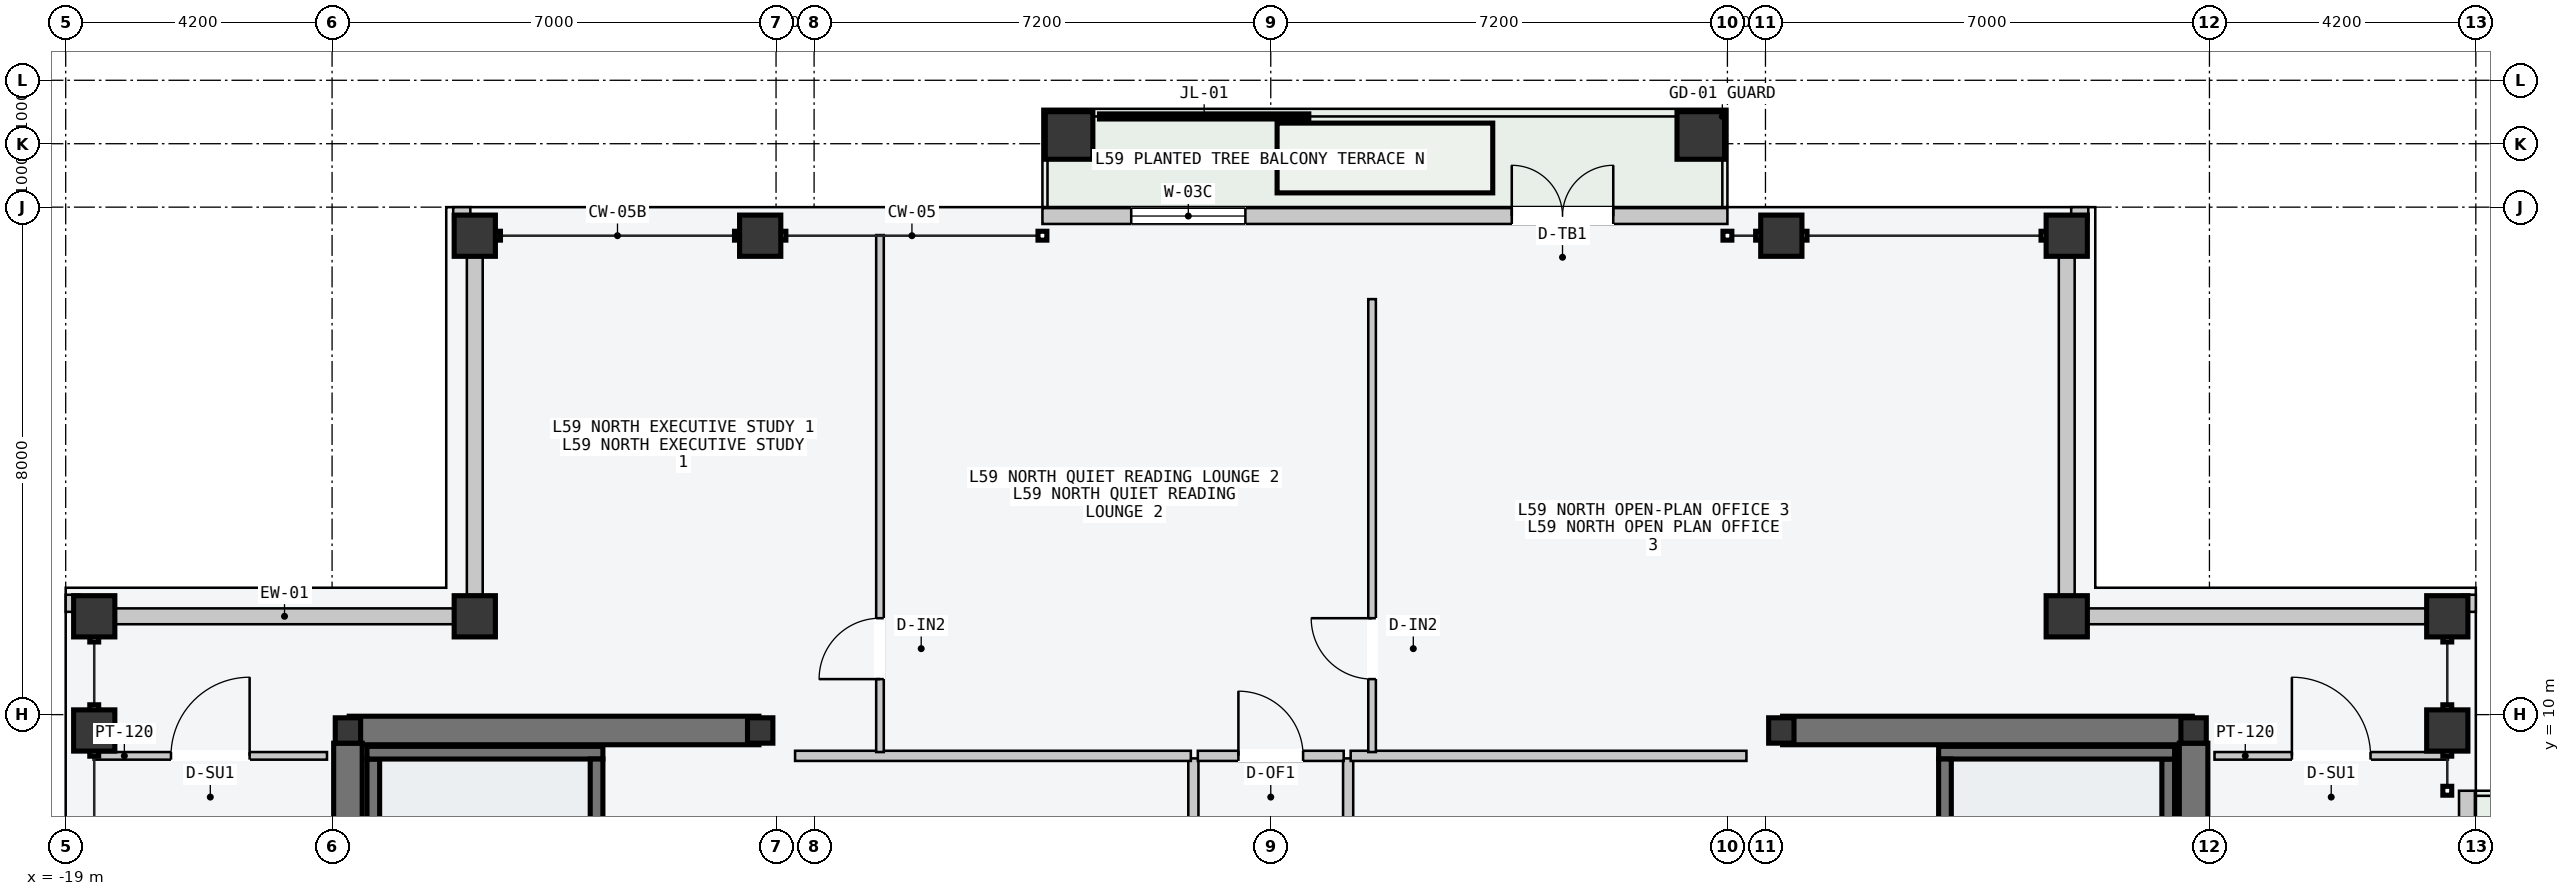
"""IFC4 building model, lengths in metres.
Left out: names, types, materials, properties, quantities, classifications, styles, units other than length and angle.
Written with IfcOpenShell. Run it as: python <this file> out.ifc"""

import sys

from ifc_helpers import new_model, si_unit, direction, frame, frame_2d, origin, origin_2d, place, context, subcontext, project, spatial, rectangle, hollow_rectangle, i_section, extrude, element, fill, save


model = new_model("IFC4")
c1 = context("Model", 3, precision=1e-05, world=origin(), true_north=direction((0.0, 1.0)))
c2 = subcontext(c1, "Body", "Model", "MODEL_VIEW")
j1 = project(units=[si_unit("LENGTHUNIT", "METRE"), si_unit("PLANEANGLEUNIT", "RADIAN")], contexts=[c1])
p1 = place(None, origin())
s1 = spatial("IfcSite", under=j1, at=p1, CompositionType="ELEMENT")
p2 = place(p1, origin())
s2 = spatial("IfcBuilding", under=s1, at=p2, CompositionType="ELEMENT")
p3 = place(p2, frame((0.0, 0.0, 225.6)))
s3 = spatial("IfcBuildingStorey", under=s2, at=p3, CompositionType="ELEMENT", Elevation=225.6)
p4 = place(p3, frame((-14.53, 9.75, -0.2), z_axis=(0.0, 0.0, 1.0), x_axis=(1.0, 0.0, 0.0)))
e1 = element("IfcWall", 1, at=p4, inside=s3, PredefinedType="SHEAR", context=c2, shape_type="SweptSolid", body=[
    extrude(rectangle(XDim=6.46, YDim=0.45, at=frame_2d((3.23, 0.0))), origin(), (0.0, 0.0, 1.0), 3.6),
])
p5 = place(p3, frame((-14.55, 0.2, -0.2), z_axis=(0.0, 0.0, 1.0), x_axis=(0.0, 1.0, 0.0)))
e2 = element("IfcWall", 2, at=p5, inside=s3, PredefinedType="SHEAR", context=c2, shape_type="SweptSolid", body=[
    extrude(rectangle(XDim=9.35, YDim=0.45, at=frame_2d((4.675, 0.0))), origin(), (0.0, 0.0, 1.0), 3.6),
])
p6 = place(p3, frame((8.07, 9.75, -0.2), z_axis=(0.0, 0.0, 1.0), x_axis=(1.0, 0.0, 0.0)))
e3 = element("IfcWall", 3, at=p6, inside=s3, PredefinedType="SHEAR", context=c2, shape_type="SweptSolid", body=[
    extrude(rectangle(XDim=6.46, YDim=0.45, at=frame_2d((3.23, 0.0))), origin(), (0.0, 0.0, 1.0), 3.6),
])
p7 = place(p3, frame((14.55, 0.2, -0.2), z_axis=(0.0, 0.0, 1.0), x_axis=(0.0, 1.0, 0.0)))
e4 = element("IfcWall", 4, at=p7, inside=s3, PredefinedType="SHEAR", context=c2, shape_type="SweptSolid", body=[
    extrude(rectangle(XDim=9.35, YDim=0.45, at=frame_2d((4.675, 0.0))), origin(), (0.0, 0.0, 1.0), 3.6),
])
for number, where, z_axis, x_axis in (
    (5, (-14.15, 1.5, -0.2), (0.0, 0.0, 1.0), (0.0, 1.0, 0.0)),
    (6, (14.15, 1.5, -0.2), (0.0, 0.0, 1.0), (0.0, 1.0, 0.0)),
):
    element("IfcWall", number, at=place(p3, frame(where, z_axis=z_axis, x_axis=x_axis)), inside=s3, PredefinedType="SOLIDWALL", context=c2, shape_type="SweptSolid", body=[
        extrude(rectangle(XDim=7.8, YDim=0.2, at=frame_2d((3.9, 0.0))), origin(), (0.0, 0.0, 1.0), 3.6),
    ])
p8 = place(p3, frame((-14.25, 9.4, -0.2), z_axis=(0.0, 0.0, 1.0), x_axis=(1.0, 0.0, 0.0)))
e7 = element("IfcWall", 7, at=p8, inside=s3, PredefinedType="SOLIDWALL", context=c2, shape_type="SweptSolid", body=[
    extrude(rectangle(XDim=3.72, YDim=0.2, at=frame_2d((1.86, 0.0))), origin(), (0.0, 0.0, 1.0), 3.6),
])
p9 = place(p3, frame((-10.63, 1.5, -0.2), z_axis=(0.0, 0.0, 1.0), x_axis=(0.0, 1.0, 0.0)))
e8 = element("IfcWall", 8, at=p9, inside=s3, PredefinedType="SOLIDWALL", context=c2, shape_type="SweptSolid", body=[
    extrude(rectangle(XDim=7.8, YDim=0.2, at=frame_2d((3.9, 0.0))), origin(), (0.0, 0.0, 1.0), 3.6),
])
p10 = place(p3, frame((10.53, 9.4, -0.2), z_axis=(0.0, 0.0, 1.0), x_axis=(1.0, 0.0, 0.0)))
e9 = element("IfcWall", 9, at=p10, inside=s3, PredefinedType="SOLIDWALL", context=c2, shape_type="SweptSolid", body=[
    extrude(rectangle(XDim=3.72, YDim=0.2, at=frame_2d((1.86, 0.0))), origin(), (0.0, 0.0, 1.0), 3.6),
])
p11 = place(p3, frame((10.63, 1.5, -0.2), z_axis=(0.0, 0.0, 1.0), x_axis=(0.0, 1.0, 0.0)))
e10 = element("IfcWall", 10, at=p11, inside=s3, PredefinedType="SOLIDWALL", context=c2, shape_type="SweptSolid", body=[
    extrude(rectangle(XDim=7.8, YDim=0.2, at=frame_2d((3.9, 0.0))), origin(), (0.0, 0.0, 1.0), 3.6),
])
for number, where, z_axis, x_axis in (
    (11, (-14.55, 9.75, 0.0), (0.0, 0.0, 1.0), (1.0, 0.0, 0.0)),
    (12, (-8.05, 9.75, 0.0), (0.0, 0.0, 1.0), (1.0, 0.0, 0.0)),
    (13, (8.05, 9.75, 0.0), (0.0, 0.0, 1.0), (1.0, 0.0, 0.0)),
    (14, (14.55, 9.75, 0.0), (0.0, 0.0, 1.0), (1.0, 0.0, 0.0)),
):
    element("IfcColumn", number, at=place(p3, frame(where, z_axis=z_axis, x_axis=x_axis)), inside=s3, PredefinedType="COLUMN", context=c2, shape_type="SweptSolid", body=[
        extrude(i_section(OverallWidth=0.4, OverallDepth=0.4, WebThickness=0.013, FlangeThickness=0.021, at=origin_2d()), origin(), (0.0, 0.0, 1.0), 3.6),
    ])
for number, where, z_axis, x_axis in (
    (15, (-12.55, 17.55, 0.0), (0.0, 0.0, 1.0), (1.0, 0.0, 0.0)),
    (16, (-8.05, 17.55, 0.0), (0.0, 0.0, 1.0), (1.0, 0.0, 0.0)),
    (17, (8.05, 17.55, 0.0), (0.0, 0.0, 1.0), (1.0, 0.0, 0.0)),
    (18, (12.55, 17.55, 0.0), (0.0, 0.0, 1.0), (1.0, 0.0, 0.0)),
    (19, (-18.55, 9.75, 0.0), (0.0, 0.0, 1.0), (0.0, 1.0, 0.0)),
    (20, (-18.55, 11.55, 0.0), (0.0, 0.0, 1.0), (0.0, 1.0, 0.0)),
    (21, (18.55, 9.75, 0.0), (0.0, 0.0, 1.0), (0.0, 1.0, 0.0)),
    (22, (18.55, 11.55, 0.0), (0.0, 0.0, 1.0), (0.0, 1.0, 0.0)),
    (23, (-12.55, 11.55, 0.0), (0.0, 0.0, 1.0), (1.0, 0.0, 0.0)),
    (24, (12.55, 11.55, 0.0), (0.0, 0.0, 1.0), (1.0, 0.0, 0.0)),
):
    element("IfcColumn", number, at=place(p3, frame(where, z_axis=z_axis, x_axis=x_axis)), inside=s3, PredefinedType="COLUMN", context=c2, shape_type="SweptSolid", body=[
        extrude(hollow_rectangle(XDim=0.65, YDim=0.65, WallThickness=0.028, at=origin_2d()), origin(), (0.0, 0.0, 1.0), 3.6),
    ])
for number, where, z_axis, x_axis in (
    (25, (-3.18, 19.13, 0.0), (0.0, 0.0, 1.0), (1.0, 0.0, 0.0)),
    (26, (6.78, 19.13, 0.0), (0.0, 0.0, 1.0), (1.0, 0.0, 0.0)),
):
    element("IfcColumn", number, at=place(p3, frame(where, z_axis=z_axis, x_axis=x_axis)), inside=s3, PredefinedType="COLUMN", context=c2, shape_type="SweptSolid", body=[
        extrude(hollow_rectangle(XDim=0.75, YDim=0.75, WallThickness=0.032, at=origin_2d()), origin(), (0.0, 0.0, 1.0), 3.6),
    ])
p12 = place(p3, frame((-3.6, 17.86, 0.0), z_axis=(0.0, 0.0, 1.0), x_axis=(1.0, 0.0, 0.0)))
e27 = element("IfcWall", 27, at=p12, inside=s3, PredefinedType="STANDARD", context=c2, shape_type="SweptSolid", body=[
    extrude(rectangle(XDim=10.8, YDim=0.25, at=frame_2d((5.4, 0.0))), origin(), (0.0, 0.0, 1.0), 3.4),
])
p13 = place(p12, frame((7.4, 0.0, 0.0)))
e28 = element("IfcOpeningElement", 28, at=p13, cuts=e27, PredefinedType="OPENING", context=c2, shape_type="SweptSolid", body=[
    extrude(rectangle(XDim=1.6, YDim=2.2, at=frame_2d((0.8, 1.1))), frame((0.0, 0.135, 0.0), z_axis=(0.0, -1.0, 0.0), x_axis=(1.0, 0.0, 0.0)), (0.0, 0.0, 1.0), 0.27),
])
p14 = place(p12, frame((1.4, 0.0, 0.85)))
e29 = element("IfcOpeningElement", 29, at=p14, cuts=e27, PredefinedType="OPENING", context=c2, shape_type="SweptSolid", body=[
    extrude(rectangle(XDim=1.8, YDim=2.05, at=frame_2d((0.9, 1.025))), frame((0.0, 0.135, 0.0), z_axis=(0.0, -1.0, 0.0), x_axis=(1.0, 0.0, 0.0)), (0.0, 0.0, 1.0), 0.27),
])
p15 = place(p3, frame((18.86, -2.0, 0.0), z_axis=(0.0, 0.0, 1.0), x_axis=(0.0, 1.0, 0.0)))
e30 = element("IfcWall", 30, at=p15, inside=s3, PredefinedType="STANDARD", context=c2, shape_type="SweptSolid", body=[
    extrude(rectangle(XDim=10.8, YDim=0.25, at=frame_2d((5.4, 0.0))), origin(), (0.0, 0.0, 1.0), 3.4),
])
p16 = place(p15, frame((6.6, 0.0, 0.0)))
e31 = element("IfcOpeningElement", 31, at=p16, cuts=e30, PredefinedType="OPENING", context=c2, shape_type="SweptSolid", body=[
    extrude(rectangle(XDim=1.6, YDim=2.2, at=frame_2d((0.8, 1.1))), frame((0.0, 0.135, 0.0), z_axis=(0.0, -1.0, 0.0), x_axis=(1.0, 0.0, 0.0)), (0.0, 0.0, 1.0), 0.27),
])
p17 = place(p15, frame((1.4, 0.0, 0.85)))
e32 = element("IfcOpeningElement", 32, at=p17, cuts=e30, PredefinedType="OPENING", context=c2, shape_type="SweptSolid", body=[
    extrude(rectangle(XDim=1.8, YDim=2.05, at=frame_2d((0.9, 1.025))), frame((0.0, 0.135, 0.0), z_axis=(0.0, -1.0, 0.0), x_axis=(1.0, 0.0, 0.0)), (0.0, 0.0, 1.0), 0.27),
])
for number, where, z_axis, x_axis in (
    (33, (-18.215, 11.55, 0.0), (0.0, 0.0, 1.0), (1.0, 0.0, 0.0)),
    (34, (-12.55, 11.885, 0.0), (0.0, 0.0, 1.0), (0.0, 1.0, 0.0)),
    (35, (12.885, 11.55, 0.0), (0.0, 0.0, 1.0), (1.0, 0.0, 0.0)),
    (36, (12.55, 11.885, 0.0), (0.0, 0.0, 1.0), (0.0, 1.0, 0.0)),
):
    element("IfcWall", number, at=place(p3, frame(where, z_axis=z_axis, x_axis=x_axis)), inside=s3, PredefinedType="STANDARD", context=c2, shape_type="SweptSolid", body=[
        extrude(rectangle(XDim=5.33, YDim=0.25, at=frame_2d((2.665, 0.0))), origin(), (0.0, 0.0, 1.0), 2.85),
    ])
for number, where, z_axis, x_axis in (
    (37, (-12.89, 17.89, 0.0), (0.0, 0.0, 1.0), (1.0, 0.0, 0.0)),
    (38, (-18.89, 11.62, 0.0), (0.0, 0.0, 1.0), (0.0, 1.0, 0.0)),
    (39, (12.62, 17.89, 0.0), (0.0, 0.0, 1.0), (1.0, 0.0, 0.0)),
    (40, (18.89, 11.62, 0.0), (0.0, 0.0, 1.0), (0.0, 1.0, 0.0)),
):
    element("IfcWall", number, at=place(p3, frame(where, z_axis=z_axis, x_axis=x_axis)), inside=s3, PredefinedType="PARAPET", context=c2, shape_type="SweptSolid", body=[
        extrude(rectangle(XDim=0.27, YDim=0.22, at=frame_2d((0.135, 0.0))), origin(), (0.0, 0.0, 1.0), 1.2),
    ])
p18 = place(p3, frame((-1.22, -3.5, 0.0), z_axis=(0.0, 0.0, 1.0), x_axis=(0.0, 1.0, 0.0)))
e41 = element("IfcWall", 41, at=p18, inside=s3, PredefinedType="PARTITIONING", context=c2, shape_type="SweptSolid", body=[
    extrude(rectangle(XDim=12.81, YDim=0.16, at=frame_2d((6.405, 0.0))), origin(), (0.0, 0.0, 1.0), 3.4),
])
p19 = place(p18, frame((6.1, 0.0, 0.0)))
e42 = element("IfcOpeningElement", 42, at=p19, cuts=e41, PredefinedType="OPENING", context=c2, shape_type="SweptSolid", body=[
    extrude(rectangle(XDim=1.24, YDim=2.24, at=frame_2d((0.62, 1.12))), frame((0.0, 0.09, 0.0), z_axis=(0.0, -1.0, 0.0), x_axis=(1.0, 0.0, 0.0)), (0.0, 0.0, 1.0), 0.18),
])
p20 = place(p18, frame((1.6, 0.0, 0.0)))
e43 = element("IfcOpeningElement", 43, at=p20, cuts=e41, PredefinedType="OPENING", context=c2, shape_type="SweptSolid", body=[
    extrude(rectangle(XDim=0.96, YDim=2.18, at=frame_2d((0.48, 1.09))), frame((0.0, 0.09, 0.0), z_axis=(0.0, -1.0, 0.0), x_axis=(1.0, 0.0, 0.0)), (0.0, 0.0, 1.0), 0.18),
])
p21 = place(p3, frame((-7.5, 9.35, 0.0), z_axis=(0.0, 0.0, 1.0), x_axis=(1.0, 0.0, 0.0)))
e44 = element("IfcWall", 44, at=p21, inside=s3, PredefinedType="PARTITIONING", context=c2, shape_type="SweptSolid", body=[
    extrude(rectangle(XDim=6.24, YDim=0.16, at=frame_2d((3.12, 0.0))), origin(), (0.0, 0.0, 1.0), 3.4),
])
p22 = place(p3, frame((1.22, -3.5, 0.0), z_axis=(0.0, 0.0, 1.0), x_axis=(0.0, 1.0, 0.0)))
e45 = element("IfcWall", 45, at=p22, inside=s3, PredefinedType="PARTITIONING", context=c2, shape_type="SweptSolid", body=[
    extrude(rectangle(XDim=12.81, YDim=0.16, at=frame_2d((6.405, 0.0))), origin(), (0.0, 0.0, 1.0), 3.4),
])
p23 = place(p22, frame((6.1, 0.0, 0.0)))
e46 = element("IfcOpeningElement", 46, at=p23, cuts=e45, PredefinedType="OPENING", context=c2, shape_type="SweptSolid", body=[
    extrude(rectangle(XDim=1.24, YDim=2.24, at=frame_2d((0.62, 1.12))), frame((0.0, 0.09, 0.0), z_axis=(0.0, -1.0, 0.0), x_axis=(1.0, 0.0, 0.0)), (0.0, 0.0, 1.0), 0.18),
])
p24 = place(p22, frame((1.6, 0.0, 0.0)))
e47 = element("IfcOpeningElement", 47, at=p24, cuts=e45, PredefinedType="OPENING", context=c2, shape_type="SweptSolid", body=[
    extrude(rectangle(XDim=0.96, YDim=2.18, at=frame_2d((0.48, 1.09))), frame((0.0, 0.09, 0.0), z_axis=(0.0, -1.0, 0.0), x_axis=(1.0, 0.0, 0.0)), (0.0, 0.0, 1.0), 0.18),
])
p25 = place(p3, frame((1.26, 9.35, 0.0), z_axis=(0.0, 0.0, 1.0), x_axis=(1.0, 0.0, 0.0)))
e48 = element("IfcWall", 48, at=p25, inside=s3, PredefinedType="PARTITIONING", context=c2, shape_type="SweptSolid", body=[
    extrude(rectangle(XDim=6.24, YDim=0.16, at=frame_2d((3.12, 0.0))), origin(), (0.0, 0.0, 1.0), 3.4),
])
p26 = place(p3, frame((-6.161, 9.41, 0.0), z_axis=(0.0, 0.0, 1.0), x_axis=(0.0, 1.0, 0.0)))
e49 = element("IfcWall", 49, at=p26, inside=s3, PredefinedType="PARTITIONING", context=c2, shape_type="SweptSolid", body=[
    extrude(rectangle(XDim=8.15, YDim=0.12, at=frame_2d((4.075, 0.0))), origin(), (0.0, 0.0, 1.0), 3.4),
])
p27 = place(p26, frame((1.15, 0.0, 0.0)))
e50 = element("IfcOpeningElement", 50, at=p27, cuts=e49, PredefinedType="OPENING", context=c2, shape_type="SweptSolid", body=[
    extrude(rectangle(XDim=0.96, YDim=2.18, at=frame_2d((0.48, 1.09))), frame((0.0, 0.07, 0.0), z_axis=(0.0, -1.0, 0.0), x_axis=(1.0, 0.0, 0.0)), (0.0, 0.0, 1.0), 0.14),
])
p28 = place(p3, frame((1.597, 9.41, 0.0), z_axis=(0.0, 0.0, 1.0), x_axis=(0.0, 1.0, 0.0)))
e51 = element("IfcWall", 51, at=p28, inside=s3, PredefinedType="PARTITIONING", context=c2, shape_type="SweptSolid", body=[
    extrude(rectangle(XDim=7.14, YDim=0.12, at=frame_2d((3.57, 0.0))), origin(), (0.0, 0.0, 1.0), 3.4),
])
p29 = place(p28, frame((1.15, 0.0, 0.0)))
e52 = element("IfcOpeningElement", 52, at=p29, cuts=e51, PredefinedType="OPENING", context=c2, shape_type="SweptSolid", body=[
    extrude(rectangle(XDim=0.96, YDim=2.18, at=frame_2d((0.48, 1.09))), frame((0.0, 0.07, 0.0), z_axis=(0.0, -1.0, 0.0), x_axis=(1.0, 0.0, 0.0)), (0.0, 0.0, 1.0), 0.14),
])
p30 = place(p3, frame((-1.15, 9.35, 0.0), z_axis=(0.0, 0.0, 1.0), x_axis=(1.0, 0.0, 0.0)))
e53 = element("IfcWall", 53, at=p30, inside=s3, PredefinedType="PARTITIONING", context=c2, shape_type="SweptSolid", body=[
    extrude(rectangle(XDim=2.3, YDim=0.16, at=frame_2d((1.15, 0.0))), origin(), (0.0, 0.0, 1.0), 3.4),
])
p31 = place(p30, frame((0.64, 0.0, 0.0)))
e54 = element("IfcOpeningElement", 54, at=p31, cuts=e53, PredefinedType="OPENING", context=c2, shape_type="SweptSolid", body=[
    extrude(rectangle(XDim=1.02, YDim=2.2, at=frame_2d((0.51, 1.1))), frame((0.0, 0.09, 0.0), z_axis=(0.0, -1.0, 0.0), x_axis=(1.0, 0.0, 0.0)), (0.0, 0.0, 1.0), 0.18),
])
p32 = place(p3, frame((-18.56, 9.35, 0.0), z_axis=(0.0, 0.0, 1.0), x_axis=(1.0, 0.0, 0.0)))
e55 = element("IfcWall", 55, at=p32, inside=s3, PredefinedType="PARTITIONING", context=c2, shape_type="SweptSolid", body=[
    extrude(rectangle(XDim=3.68, YDim=0.12, at=frame_2d((1.84, 0.0))), origin(), (0.0, 0.0, 1.0), 3.4),
])
p33 = place(p32, frame((1.22, 0.0, 0.0)))
e56 = element("IfcOpeningElement", 56, at=p33, cuts=e55, PredefinedType="OPENING", context=c2, shape_type="SweptSolid", body=[
    extrude(rectangle(XDim=1.24, YDim=2.24, at=frame_2d((0.62, 1.12))), frame((0.0, 0.07, 0.0), z_axis=(0.0, -1.0, 0.0), x_axis=(1.0, 0.0, 0.0)), (0.0, 0.0, 1.0), 0.14),
])
p34 = place(p3, frame((14.88, 9.35, 0.0), z_axis=(0.0, 0.0, 1.0), x_axis=(1.0, 0.0, 0.0)))
e57 = element("IfcWall", 57, at=p34, inside=s3, PredefinedType="PARTITIONING", context=c2, shape_type="SweptSolid", body=[
    extrude(rectangle(XDim=3.68, YDim=0.12, at=frame_2d((1.84, 0.0))), origin(), (0.0, 0.0, 1.0), 3.4),
])
p35 = place(p34, frame((1.22, 0.0, 0.0)))
e58 = element("IfcOpeningElement", 58, at=p35, cuts=e57, PredefinedType="OPENING", context=c2, shape_type="SweptSolid", body=[
    extrude(rectangle(XDim=1.24, YDim=2.24, at=frame_2d((0.62, 1.12))), frame((0.0, 0.07, 0.0), z_axis=(0.0, -1.0, 0.0), x_axis=(1.0, 0.0, 0.0)), (0.0, 0.0, 1.0), 0.14),
])
p36 = place(p13, origin())
e59 = element("IfcDoor", 59, at=p36, inside=s3, OperationType="DOUBLE_DOOR_SINGLE_SWING", PredefinedType="DOOR", context=c2, shape_type="SweptSolid", body=[
    extrude(rectangle(XDim=1.6, YDim=2.2, at=frame_2d((0.8, 1.1))), frame((0.0, 0.025, 0.0), z_axis=(0.0, -1.0, 0.0), x_axis=(1.0, 0.0, 0.0)), (0.0, 0.0, 1.0), 0.05),
])
fill(e28, e59)
p37 = place(p14, origin())
e60 = element("IfcWindow", 60, at=p37, inside=s3, PartitioningType="SINGLE_PANEL", PredefinedType="WINDOW", context=c2, shape_type="SweptSolid", body=[
    extrude(rectangle(XDim=1.8, YDim=2.05, at=frame_2d((0.9, 1.025))), frame((0.0, 0.03, 0.0), z_axis=(0.0, -1.0, 0.0), x_axis=(1.0, 0.0, 0.0)), (0.0, 0.0, 1.0), 0.06),
])
fill(e29, e60)
p38 = place(p27, origin())
e61 = element("IfcDoor", 61, at=p38, inside=s3, OperationType="SINGLE_SWING_LEFT", PredefinedType="DOOR", context=c2, shape_type="SweptSolid", body=[
    extrude(rectangle(XDim=0.96, YDim=2.18, at=frame_2d((0.48, 1.09))), frame((0.0, 0.025, 0.0), z_axis=(0.0, -1.0, 0.0), x_axis=(1.0, 0.0, 0.0)), (0.0, 0.0, 1.0), 0.05),
])
fill(e50, e61)
p39 = place(p29, origin())
e62 = element("IfcDoor", 62, at=p39, inside=s3, OperationType="SINGLE_SWING_RIGHT", PredefinedType="DOOR", context=c2, shape_type="SweptSolid", body=[
    extrude(rectangle(XDim=0.96, YDim=2.18, at=frame_2d((0.48, 1.09))), frame((0.0, 0.025, 0.0), z_axis=(0.0, -1.0, 0.0), x_axis=(1.0, 0.0, 0.0)), (0.0, 0.0, 1.0), 0.05),
])
fill(e52, e62)
p40 = place(p31, origin())
e63 = element("IfcDoor", 63, at=p40, inside=s3, OperationType="SINGLE_SWING_LEFT", PredefinedType="DOOR", context=c2, shape_type="SweptSolid", body=[
    extrude(rectangle(XDim=1.02, YDim=2.2, at=frame_2d((0.51, 1.1))), frame((0.0, 0.025, 0.0), z_axis=(0.0, -1.0, 0.0), x_axis=(1.0, 0.0, 0.0)), (0.0, 0.0, 1.0), 0.05),
])
fill(e54, e63)
p41 = place(p33, origin())
e64 = element("IfcDoor", 64, at=p41, inside=s3, OperationType="SINGLE_SWING_RIGHT", PredefinedType="DOOR", context=c2, shape_type="SweptSolid", body=[
    extrude(rectangle(XDim=1.24, YDim=2.24, at=frame_2d((0.62, 1.12))), frame((0.0, 0.025, 0.0), z_axis=(0.0, -1.0, 0.0), x_axis=(1.0, 0.0, 0.0)), (0.0, 0.0, 1.0), 0.05),
])
fill(e56, e64)
p42 = place(p35, origin())
e65 = element("IfcDoor", 65, at=p42, inside=s3, OperationType="SINGLE_SWING_LEFT", PredefinedType="DOOR", context=c2, shape_type="SweptSolid", body=[
    extrude(rectangle(XDim=1.24, YDim=2.24, at=frame_2d((0.62, 1.12))), frame((0.0, 0.025, 0.0), z_axis=(0.0, -1.0, 0.0), x_axis=(1.0, 0.0, 0.0)), (0.0, 0.0, 1.0), 0.05),
])
fill(e58, e65)
save(model, sys.argv[1])
